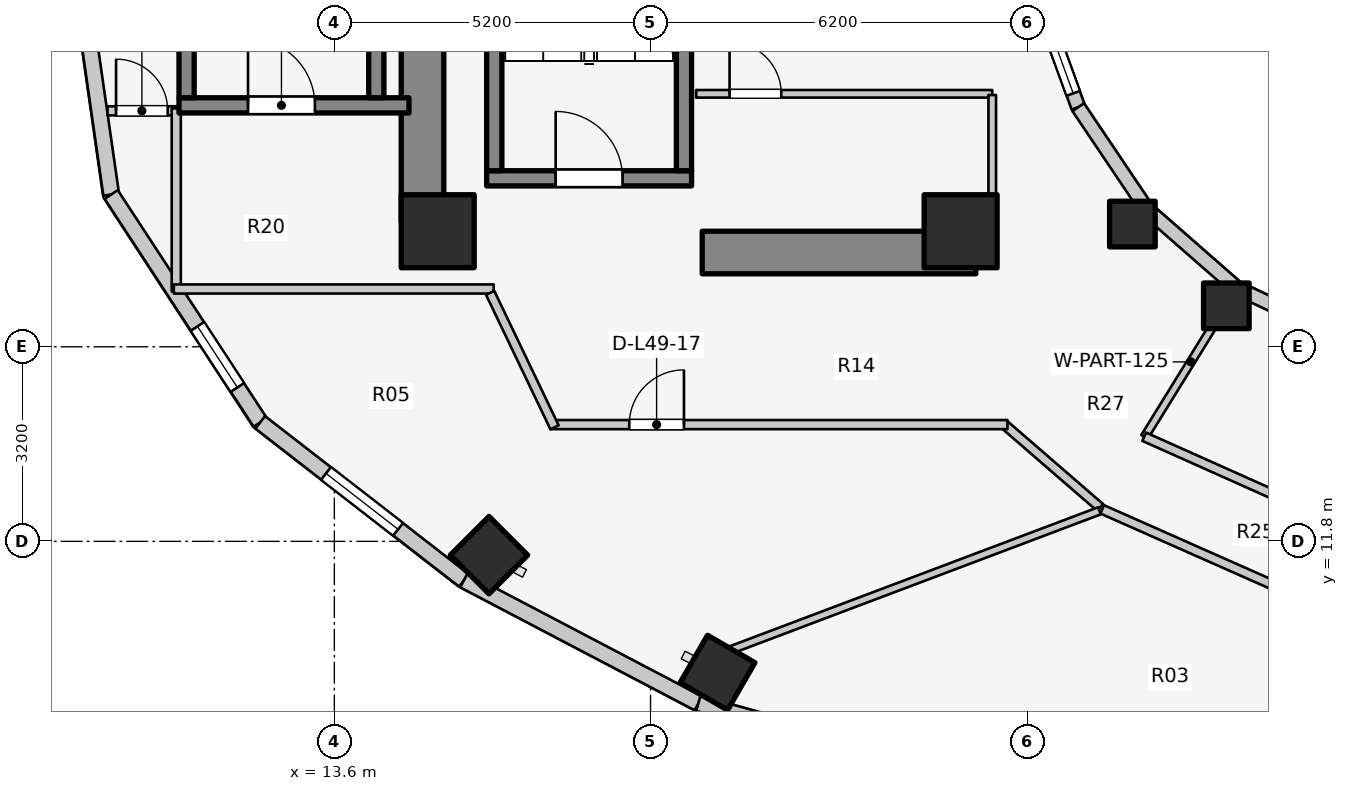
"""IFC4 building model, lengths in metres.
Left out: names, types, materials, properties, quantities, classifications, styles, units other than length and angle.
Written with IfcOpenShell. Run it as: python <this file> out.ifc"""

import sys

from ifc_helpers import new_model, si_unit, direction, frame, frame_2d, origin, origin_2d, place, context, subcontext, project, spatial, rectangle, extrude, element, fill, save


model = new_model("IFC4")
c1 = context("Model", 3, precision=1e-05, world=origin(), true_north=direction((0.0, 1.0)))
c2 = subcontext(c1, "Body", "Model", "MODEL_VIEW")
j1 = project(units=[si_unit("LENGTHUNIT", "METRE"), si_unit("PLANEANGLEUNIT", "RADIAN")], contexts=[c1])
p1 = place(None, origin())
s1 = spatial("IfcSite", under=j1, at=p1, CompositionType="ELEMENT")
p2 = place(p1, origin())
s2 = spatial("IfcBuilding", under=s1, at=p2, CompositionType="ELEMENT")
p3 = place(p2, frame((0.0, 0.0, 162.2)))
s3 = spatial("IfcBuildingStorey", under=s2, at=p3, CompositionType="ELEMENT", Elevation=162.2)
p4 = place(p3, frame((15.05, 17.05, 0.0), z_axis=(0.0, 0.0, 1.0), x_axis=(0.0, 1.0, 0.0)))
e1 = element("IfcWall", 1, at=p4, inside=s3, PredefinedType="SHEAR", context=c2, shape_type="SweptSolid", body=[
    extrude(rectangle(XDim=12.8, YDim=0.7, at=frame_2d((6.4, 0.0))), origin(), (0.0, 0.0, 1.0), 3.1),
])
p5 = place(p3, frame((19.65, 16.55, 0.0), z_axis=(0.0, 0.0, 1.0), x_axis=(1.0, 0.0, 0.0)))
e2 = element("IfcWall", 2, at=p5, inside=s3, PredefinedType="SHEAR", context=c2, shape_type="SweptSolid", body=[
    extrude(rectangle(XDim=4.5, YDim=0.7, at=frame_2d((2.25, 0.0))), origin(), (0.0, 0.0, 1.0), 3.1),
])
p6 = place(p3, frame((16.105, 17.77, 0.0), z_axis=(0.0, 0.0, 1.0), x_axis=(1.0, 0.0, 0.0)))
e3 = element("IfcWall", 3, at=p6, inside=s3, PredefinedType="SOLIDWALL", context=c2, shape_type="SweptSolid", body=[
    extrude(rectangle(XDim=3.37, YDim=0.25, at=frame_2d((1.685, 0.0))), origin(), (0.0, 0.0, 1.0), 3.1),
])
p7 = place(p6, frame((1.135, 0.0, 0.0)))
e4 = element("IfcOpeningElement", 4, at=p7, cuts=e3, PredefinedType="OPENING", context=c2, shape_type="SweptSolid", body=[
    extrude(rectangle(XDim=1.1, YDim=2.1, at=frame_2d((0.55, 1.05))), frame((0.0, 0.135, 0.0), z_axis=(0.0, -1.0, 0.0), x_axis=(1.0, 0.0, 0.0)), (0.0, 0.0, 1.0), 0.27),
])
for number, where, z_axis, x_axis in (
    (5, (16.23, 17.895, 0.0), (0.0, 0.0, 1.0), (0.0, 1.0, 0.0)),
    (6, (19.35, 17.895, 0.0), (0.0, 0.0, 1.0), (0.0, 1.0, 0.0)),
):
    element("IfcWall", number, at=place(p3, frame(where, z_axis=z_axis, x_axis=x_axis)), inside=s3, PredefinedType="SOLIDWALL", context=c2, shape_type="SweptSolid", body=[
        extrude(rectangle(XDim=7.81, YDim=0.25, at=frame_2d((3.905, 0.0))), origin(), (0.0, 0.0, 1.0), 3.1),
    ])
p8 = place(p3, frame((11.045, 18.97, 0.0), z_axis=(0.0, 0.0, 1.0), x_axis=(1.0, 0.0, 0.0)))
e7 = element("IfcWall", 7, at=p8, inside=s3, PredefinedType="SOLIDWALL", context=c2, shape_type="SweptSolid", body=[
    extrude(rectangle(XDim=3.782, YDim=0.25, at=frame_2d((1.891, 0.0))), origin(), (0.0, 0.0, 1.0), 3.1),
])
p9 = place(p8, frame((1.135, 0.0, 0.0)))
e8 = element("IfcOpeningElement", 8, at=p9, cuts=e7, PredefinedType="OPENING", context=c2, shape_type="SweptSolid", body=[
    extrude(rectangle(XDim=1.1, YDim=2.1, at=frame_2d((0.55, 1.05))), frame((0.0, 0.135, 0.0), z_axis=(0.0, -1.0, 0.0), x_axis=(1.0, 0.0, 0.0)), (0.0, 0.0, 1.0), 0.27),
])
for number, where, z_axis, x_axis in (
    (9, (11.17, 19.095, 0.0), (0.0, 0.0, 1.0), (0.0, 1.0, 0.0)),
    (10, (14.29, 19.095, 0.0), (0.0, 0.0, 1.0), (0.0, 1.0, 0.0)),
):
    element("IfcWall", number, at=place(p3, frame(where, z_axis=z_axis, x_axis=x_axis)), inside=s3, PredefinedType="SOLIDWALL", context=c2, shape_type="SweptSolid", body=[
        extrude(rectangle(XDim=7.81, YDim=0.25, at=frame_2d((3.905, 0.0))), origin(), (0.0, 0.0, 1.0), 3.1),
    ])
for number, where, z_axis, x_axis in (
    (11, (15.3, 16.9, 0.0), (0.0, 0.0, 1.0), (1.0, 0.0, 0.0)),
    (12, (23.9, 16.9, 0.0), (0.0, 0.0, 1.0), (1.0, 0.0, 0.0)),
):
    element("IfcColumn", number, at=place(p3, frame(where, z_axis=z_axis, x_axis=x_axis)), inside=s3, PredefinedType="COLUMN", context=c2, shape_type="SweptSolid", body=[
        extrude(rectangle(XDim=1.2, YDim=1.2, at=origin_2d()), origin(), (0.0, 0.0, 1.0), 3.1),
    ])
p10 = place(p3, frame((26.725, 17.018, 0.0), z_axis=(0.0, 0.0, 1.0), x_axis=(1.0, 0.0, 0.0)))
e13 = element("IfcColumn", 13, at=p10, inside=s3, PredefinedType="COLUMN", context=c2, shape_type="SweptSolid", body=[
    extrude(rectangle(XDim=0.75, YDim=0.75, at=origin_2d()), origin(), (0.0, 0.0, 1.0), 3.1),
])
p11 = place(p3, frame((16.143, 11.573, 0.0), z_axis=(0.0, 0.0, 1.0), x_axis=(-0.707106781187, -0.707106781187, 0.0)))
e14 = element("IfcColumn", 14, at=p11, inside=s3, PredefinedType="COLUMN", context=c2, shape_type="SweptSolid", body=[
    extrude(rectangle(XDim=0.9, YDim=0.9, at=origin_2d()), origin(), (0.0, 0.0, 1.0), 3.1),
])
p12 = place(p3, frame((28.27, 15.673, 0.0), z_axis=(0.0, 0.0, 1.0), x_axis=(1.0, 0.0, 0.0)))
e15 = element("IfcColumn", 15, at=p12, inside=s3, PredefinedType="COLUMN", context=c2, shape_type="SweptSolid", body=[
    extrude(rectangle(XDim=0.75, YDim=0.75, at=origin_2d()), origin(), (0.0, 0.0, 1.0), 3.1),
])
p13 = place(p3, frame((19.902, 9.641, 0.0), z_axis=(0.0, 0.0, 1.0), x_axis=(-0.5, -0.866025403784, 0.0)))
e16 = element("IfcColumn", 16, at=p13, inside=s3, PredefinedType="COLUMN", context=c2, shape_type="SweptSolid", body=[
    extrude(rectangle(XDim=0.9, YDim=0.9, at=origin_2d()), origin(), (0.0, 0.0, 1.0), 3.1),
])
p14 = place(p3, frame((25.123, 20.898, 0.0), z_axis=(0.0, 0.0, 1.0), x_axis=(0.341423187295, -0.93990968033, 0.0)))
e17 = element("IfcWall", 17, at=p14, inside=s3, PredefinedType="STANDARD", context=c2, shape_type="SweptSolid", body=[
    extrude(rectangle(XDim=2.084, YDim=0.23, at=frame_2d((1.042, 0.0))), origin(), (0.0, 0.0, 1.0), 2.84),
])
p15 = place(p14, frame((0.242, 0.0, 0.85)))
e18 = element("IfcOpeningElement", 18, at=p15, cuts=e17, PredefinedType="OPENING", context=c2, shape_type="SweptSolid", body=[
    extrude(rectangle(XDim=1.6, YDim=1.65, at=frame_2d((0.8, 0.825))), frame((0.0, 0.125, 0.0), z_axis=(0.0, -1.0, 0.0), x_axis=(1.0, 0.0, 0.0)), (0.0, 0.0, 1.0), 0.25),
])
p16 = place(p3, frame((25.834, 18.94, 0.0), z_axis=(0.0, 0.0, 1.0), x_axis=(0.558197800898, -0.829707909492, 0.0)))
e19 = element("IfcWall", 19, at=p16, inside=s3, PredefinedType="STANDARD", context=c2, shape_type="SweptSolid", body=[
    extrude(rectangle(XDim=2.027, YDim=0.23, at=frame_2d((1.013, 0.0))), origin(), (0.0, 0.0, 1.0), 2.16),
])
p17 = place(p3, frame((26.965, 17.258, 0.0), z_axis=(0.0, 0.0, 1.0), x_axis=(0.752576694707, -0.658504607869, 0.0)))
e20 = element("IfcWall", 20, at=p17, inside=s3, PredefinedType="STANDARD", context=c2, shape_type="SweptSolid", body=[
    extrude(rectangle(XDim=1.959, YDim=0.23, at=frame_2d((0.98, 0.0))), origin(), (0.0, 0.0, 1.0), 2.16),
])
p18 = place(p3, frame((28.44, 15.968, 0.0), z_axis=(0.0, 0.0, 1.0), x_axis=(0.904179699603, -0.427152280606, 0.0)))
e21 = element("IfcWall", 21, at=p18, inside=s3, PredefinedType="STANDARD", context=c2, shape_type="SweptSolid", body=[
    extrude(rectangle(XDim=1.899, YDim=0.23, at=frame_2d((0.95, 0.0))), origin(), (0.0, 0.0, 1.0), 2.16),
])
p19 = place(p3, frame((9.14, 23.0, 0.0), z_axis=(0.0, 0.0, 1.0), x_axis=(0.142227632286, -0.989833976288, 0.0)))
e22 = element("IfcWall", 22, at=p19, inside=s3, PredefinedType="STANDARD", context=c2, shape_type="SweptSolid", body=[
    extrude(rectangle(XDim=5.553, YDim=0.26, at=frame_2d((2.776, 0.0))), origin(), (0.0, 0.0, 1.0), 2.85),
])
p20 = place(p19, frame((1.506, 0.0, 0.75)))
e23 = element("IfcOpeningElement", 23, at=p20, cuts=e22, PredefinedType="OPENING", context=c2, shape_type="SweptSolid", body=[
    extrude(rectangle(XDim=1.2, YDim=1.5, at=frame_2d((0.6, 0.75))), frame((0.0, 0.14, 0.0), z_axis=(0.0, -1.0, 0.0), x_axis=(1.0, 0.0, 0.0)), (0.0, 0.0, 1.0), 0.28),
])
p21 = place(p3, frame((9.93, 17.503, 0.0), z_axis=(0.0, 0.0, 1.0), x_axis=(0.547456494366, -0.836834145322, 0.0)))
e24 = element("IfcWall", 24, at=p21, inside=s3, PredefinedType="STANDARD", context=c2, shape_type="SweptSolid", body=[
    extrude(rectangle(XDim=4.477, YDim=0.26, at=frame_2d((2.239, 0.0))), origin(), (0.0, 0.0, 1.0), 2.85),
])
p22 = place(p21, frame((2.591, 0.0, 0.75)))
e25 = element("IfcOpeningElement", 25, at=p22, cuts=e24, PredefinedType="OPENING", context=c2, shape_type="SweptSolid", body=[
    extrude(rectangle(XDim=1.2, YDim=1.5, at=frame_2d((0.6, 0.75))), frame((0.0, 0.14, 0.0), z_axis=(0.0, -1.0, 0.0), x_axis=(1.0, 0.0, 0.0)), (0.0, 0.0, 1.0), 0.28),
])
p23 = place(p3, frame((12.381, 13.757, 0.0), z_axis=(0.0, 0.0, 1.0), x_axis=(0.790185650662, -0.612867552973, 0.0)))
e26 = element("IfcWall", 26, at=p23, inside=s3, PredefinedType="STANDARD", context=c2, shape_type="SweptSolid", body=[
    extrude(rectangle(XDim=4.239, YDim=0.26, at=frame_2d((2.12, 0.0))), origin(), (0.0, 0.0, 1.0), 2.85),
])
p24 = place(p23, frame((1.37, 0.0, 0.75)))
e27 = element("IfcOpeningElement", 27, at=p24, cuts=e26, PredefinedType="OPENING", context=c2, shape_type="SweptSolid", body=[
    extrude(rectangle(XDim=1.5, YDim=1.6, at=frame_2d((0.75, 0.8))), frame((0.0, 0.14, 0.0), z_axis=(0.0, -1.0, 0.0), x_axis=(1.0, 0.0, 0.0)), (0.0, 0.0, 1.0), 0.28),
])
p25 = place(p3, frame((15.731, 11.158, 0.0), z_axis=(0.0, 0.0, 1.0), x_axis=(0.885660265226, -0.464333818065, 0.0)))
e28 = element("IfcWall", 28, at=p25, inside=s3, PredefinedType="STANDARD", context=c2, shape_type="SweptSolid", body=[
    extrude(rectangle(XDim=4.354, YDim=0.26, at=frame_2d((2.177, 0.0))), origin(), (0.0, 0.0, 1.0), 2.85),
])
p26 = place(p3, frame((19.587, 9.137, 0.0), z_axis=(0.0, 0.0, 1.0), x_axis=(0.963953455704, -0.26607092144, 0.0)))
e29 = element("IfcWall", 29, at=p26, inside=s3, PredefinedType="STANDARD", context=c2, shape_type="SweptSolid", body=[
    extrude(rectangle(XDim=5.237, YDim=0.26, at=frame_2d((2.618, 0.0))), origin(), (0.0, 0.0, 1.0), 2.85),
])
p27 = place(p26, frame((1.868, 0.0, 0.75)))
e30 = element("IfcOpeningElement", 30, at=p27, cuts=e29, PredefinedType="OPENING", context=c2, shape_type="SweptSolid", body=[
    extrude(rectangle(XDim=1.5, YDim=1.6, at=frame_2d((0.75, 0.8))), frame((0.0, 0.14, 0.0), z_axis=(0.0, -1.0, 0.0), x_axis=(1.0, 0.0, 0.0)), (0.0, 0.0, 1.0), 0.28),
])
p28 = place(p3, frame((19.55, 19.16, 0.0), z_axis=(0.0, 0.0, 1.0), x_axis=(1.0, 0.0, 0.0)))
e31 = element("IfcWall", 31, at=p28, inside=s3, PredefinedType="PARTITIONING", context=c2, shape_type="SweptSolid", body=[
    extrude(rectangle(XDim=4.87, YDim=0.125, at=frame_2d((2.435, 0.0))), origin(), (0.0, 0.0, 1.0), 2.12),
])
p29 = place(p28, frame((0.55, 0.0, 0.0)))
e32 = element("IfcOpeningElement", 32, at=p29, cuts=e31, PredefinedType="OPENING", context=c2, shape_type="SweptSolid", body=[
    extrude(rectangle(XDim=0.85, YDim=2.05, at=frame_2d((0.425, 1.025))), frame((0.0, 0.073, 0.0), z_axis=(0.0, -1.0, 0.0), x_axis=(1.0, 0.0, 0.0)), (0.0, 0.0, 1.0), 0.145),
])
p30 = place(p3, frame((24.42, 17.1, 0.0), z_axis=(0.0, 0.0, 1.0), x_axis=(0.0, 1.0, 0.0)))
e33 = element("IfcWall", 33, at=p30, inside=s3, PredefinedType="PARTITIONING", context=c2, shape_type="SweptSolid", body=[
    extrude(rectangle(XDim=2.04, YDim=0.125, at=frame_2d((1.02, 0.0))), origin(), (0.0, 0.0, 1.0), 2.232),
])
p31 = place(p3, frame((9.87, 18.88, 0.0), z_axis=(0.0, 0.0, 1.0), x_axis=(1.0, 0.0, 0.0)))
e34 = element("IfcWall", 34, at=p31, inside=s3, PredefinedType="PARTITIONING", context=c2, shape_type="SweptSolid", body=[
    extrude(rectangle(XDim=1.17, YDim=0.15, at=frame_2d((0.585, 0.0))), origin(), (0.0, 0.0, 1.0), 2.855),
])
p32 = place(p31, frame((0.14, 0.0, 0.0)))
e35 = element("IfcOpeningElement", 35, at=p32, cuts=e34, PredefinedType="OPENING", context=c2, shape_type="SweptSolid", body=[
    extrude(rectangle(XDim=0.85, YDim=2.05, at=frame_2d((0.425, 1.025))), frame((0.0, 0.085, 0.0), z_axis=(0.0, -1.0, 0.0), x_axis=(1.0, 0.0, 0.0)), (0.0, 0.0, 1.0), 0.17),
])
p33 = place(p3, frame((11.0, 15.91, 0.0), z_axis=(0.0, 0.0, 1.0), x_axis=(0.0, 1.0, 0.0)))
e36 = element("IfcWall", 36, at=p33, inside=s3, PredefinedType="PARTITIONING", context=c2, shape_type="SweptSolid", body=[
    extrude(rectangle(XDim=3.01, YDim=0.15, at=frame_2d((1.505, 0.0))), origin(), (0.0, 0.0, 1.0), 2.855),
])
p34 = place(p3, frame((10.96, 15.95, 0.0), z_axis=(0.0, 0.0, 1.0), x_axis=(1.0, 0.0, 0.0)))
e37 = element("IfcWall", 37, at=p34, inside=s3, PredefinedType="PARTITIONING", context=c2, shape_type="SweptSolid", body=[
    extrude(rectangle(XDim=5.26, YDim=0.15, at=frame_2d((2.63, 0.0))), origin(), (0.0, 0.0, 1.0), 2.22),
])
p35 = place(p3, frame((26.193, 12.358, 0.0), z_axis=(0.0, 0.0, 1.0), x_axis=(-0.756055312247, 0.654507727092, 0.0)))
e38 = element("IfcWall", 38, at=p35, inside=s3, PredefinedType="PARTITIONING", context=c2, shape_type="SweptSolid", body=[
    extrude(rectangle(XDim=2.111, YDim=0.15, at=frame_2d((1.055, 0.0))), origin(), (0.0, 0.0, 1.0), 2.299),
])
p36 = place(p3, frame((17.15, 13.72, 0.0), z_axis=(0.0, 0.0, 1.0), x_axis=(1.0, 0.0, 0.0)))
e39 = element("IfcWall", 39, at=p36, inside=s3, PredefinedType="PARTITIONING", context=c2, shape_type="SweptSolid", body=[
    extrude(rectangle(XDim=7.52, YDim=0.15, at=frame_2d((3.76, 0.0))), origin(), (0.0, 0.0, 1.0), 2.299),
])
p37 = place(p36, frame((1.3, 0.0, 0.0)))
e40 = element("IfcOpeningElement", 40, at=p37, cuts=e39, PredefinedType="OPENING", context=c2, shape_type="SweptSolid", body=[
    extrude(rectangle(XDim=0.9, YDim=2.1, at=frame_2d((0.45, 1.05))), frame((0.0, 0.085, 0.0), z_axis=(0.0, -1.0, 0.0), x_axis=(1.0, 0.0, 0.0)), (0.0, 0.0, 1.0), 0.17),
])
p38 = place(p3, frame((17.222, 13.675, 0.0), z_axis=(0.0, 0.0, 1.0), x_axis=(-0.431973389813, 0.901886351207, 0.0)))
e41 = element("IfcWall", 41, at=p38, inside=s3, PredefinedType="PARTITIONING", context=c2, shape_type="SweptSolid", body=[
    extrude(rectangle(XDim=2.452, YDim=0.15, at=frame_2d((1.226, 0.0))), origin(), (0.0, 0.0, 1.0), 2.855),
])
p39 = place(p3, frame((28.45, 15.985, 0.0), z_axis=(0.0, 0.0, 1.0), x_axis=(-0.525627246902, -0.850714991824, 0.0)))
e42 = element("IfcWall", 42, at=p39, inside=s3, PredefinedType="PARTITIONING", context=c2, shape_type="SweptSolid", body=[
    extrude(rectangle(XDim=2.901, YDim=0.125, at=frame_2d((1.451, 0.0))), origin(), (0.0, 0.0, 1.0), 2.299),
])
p40 = place(p3, frame((26.919, 13.521, 0.0), z_axis=(0.0, 0.0, 1.0), x_axis=(0.912888568324, -0.408208845842, 0.0)))
e43 = element("IfcWall", 43, at=p40, inside=s3, PredefinedType="PARTITIONING", context=c2, shape_type="SweptSolid", body=[
    extrude(rectangle(XDim=2.69, YDim=0.15, at=frame_2d((1.345, 0.0))), origin(), (0.0, 0.0, 1.0), 2.299),
])
p41 = place(p3, frame((26.184, 12.302, 0.0), z_axis=(0.0, 0.0, 1.0), x_axis=(-0.935601484289, -0.353057874288, 0.0)))
e44 = element("IfcWall", 44, at=p41, inside=s3, PredefinedType="PARTITIONING", context=c2, shape_type="SweptSolid", body=[
    extrude(rectangle(XDim=6.484, YDim=0.125, at=frame_2d((3.242, 0.0))), origin(), (0.0, 0.0, 1.0), 2.299),
])
p42 = place(p3, frame((26.228, 12.326, 0.0), z_axis=(0.0, 0.0, 1.0), x_axis=(0.914324470734, -0.404982422108, 0.0)))
e45 = element("IfcWall", 45, at=p42, inside=s3, PredefinedType="PARTITIONING", context=c2, shape_type="SweptSolid", body=[
    extrude(rectangle(XDim=3.058, YDim=0.15, at=frame_2d((1.529, 0.0))), origin(), (0.0, 0.0, 1.0), 2.299),
])
p43 = place(p15, origin())
e46 = element("IfcWindow", 46, at=p43, inside=s3, PartitioningType="SINGLE_PANEL", PredefinedType="WINDOW", context=c2, shape_type="SweptSolid", body=[
    extrude(rectangle(XDim=1.6, YDim=1.65, at=frame_2d((0.8, 0.825))), frame((0.0, 0.03, 0.0), z_axis=(0.0, -1.0, 0.0), x_axis=(1.0, 0.0, 0.0)), (0.0, 0.0, 1.0), 0.06),
])
fill(e18, e46)
p44 = place(p22, origin())
e47 = element("IfcWindow", 47, at=p44, inside=s3, PartitioningType="SINGLE_PANEL", PredefinedType="WINDOW", context=c2, shape_type="SweptSolid", body=[
    extrude(rectangle(XDim=1.2, YDim=1.5, at=frame_2d((0.6, 0.75))), frame((0.0, 0.03, 0.0), z_axis=(0.0, -1.0, 0.0), x_axis=(1.0, 0.0, 0.0)), (0.0, 0.0, 1.0), 0.06),
])
fill(e25, e47)
p45 = place(p24, origin())
e48 = element("IfcWindow", 48, at=p45, inside=s3, PartitioningType="SINGLE_PANEL", PredefinedType="WINDOW", context=c2, shape_type="SweptSolid", body=[
    extrude(rectangle(XDim=1.5, YDim=1.6, at=frame_2d((0.75, 0.8))), frame((0.0, 0.03, 0.0), z_axis=(0.0, -1.0, 0.0), x_axis=(1.0, 0.0, 0.0)), (0.0, 0.0, 1.0), 0.06),
])
fill(e27, e48)
p46 = place(p7, origin())
e49 = element("IfcDoor", 49, at=p46, inside=s3, OperationType="SINGLE_SWING_LEFT", PredefinedType="DOOR", context=c2, shape_type="SweptSolid", body=[
    extrude(rectangle(XDim=1.1, YDim=2.1, at=frame_2d((0.55, 1.05))), frame((0.0, 0.025, 0.0), z_axis=(0.0, -1.0, 0.0), x_axis=(1.0, 0.0, 0.0)), (0.0, 0.0, 1.0), 0.05),
])
fill(e4, e49)
p47 = place(p9, origin())
e50 = element("IfcDoor", 50, at=p47, inside=s3, OperationType="SINGLE_SWING_LEFT", PredefinedType="DOOR", context=c2, shape_type="SweptSolid", body=[
    extrude(rectangle(XDim=1.1, YDim=2.1, at=frame_2d((0.55, 1.05))), frame((0.0, 0.025, 0.0), z_axis=(0.0, -1.0, 0.0), x_axis=(1.0, 0.0, 0.0)), (0.0, 0.0, 1.0), 0.05),
])
fill(e8, e50)
p48 = place(p29, origin())
e51 = element("IfcDoor", 51, at=p48, inside=s3, OperationType="SINGLE_SWING_LEFT", PredefinedType="DOOR", context=c2, shape_type="SweptSolid", body=[
    extrude(rectangle(XDim=0.85, YDim=2.05, at=frame_2d((0.425, 1.025))), frame((0.0, 0.025, 0.0), z_axis=(0.0, -1.0, 0.0), x_axis=(1.0, 0.0, 0.0)), (0.0, 0.0, 1.0), 0.05),
])
fill(e32, e51)
p49 = place(p32, origin())
e52 = element("IfcDoor", 52, at=p49, inside=s3, OperationType="SINGLE_SWING_LEFT", PredefinedType="DOOR", context=c2, shape_type="SweptSolid", body=[
    extrude(rectangle(XDim=0.85, YDim=2.05, at=frame_2d((0.425, 1.025))), frame((0.0, 0.025, 0.0), z_axis=(0.0, -1.0, 0.0), x_axis=(1.0, 0.0, 0.0)), (0.0, 0.0, 1.0), 0.05),
])
fill(e35, e52)
p50 = place(p37, origin())
e53 = element("IfcDoor", 53, at=p50, inside=s3, OperationType="SINGLE_SWING_RIGHT", PredefinedType="DOOR", context=c2, shape_type="SweptSolid", body=[
    extrude(rectangle(XDim=0.9, YDim=2.1, at=frame_2d((0.45, 1.05))), frame((0.0, 0.025, 0.0), z_axis=(0.0, -1.0, 0.0), x_axis=(1.0, 0.0, 0.0)), (0.0, 0.0, 1.0), 0.05),
])
fill(e40, e53)
save(model, sys.argv[1])
